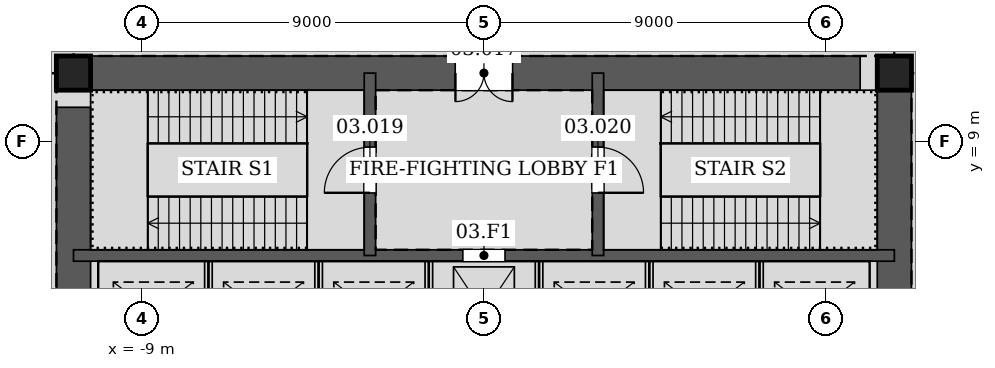
"""IFC4 building model, lengths in metres.
Left out: names, types, materials, properties, quantities, classifications, styles, units other than length and angle.
Written with IfcOpenShell. Run it as: python <this file> out.ifc"""

import sys

from ifc_helpers import new_model, si_unit, direction, frame, frame_2d, origin, origin_2d, place, context, subcontext, project, spatial, rectangle, hollow_rectangle, extrude, element, fill, save


model = new_model("IFC4")
c1 = context("Model", 3, precision=1e-05, world=origin(), true_north=direction((0.0, 1.0)))
c2 = subcontext(c1, "Body", "Model", "MODEL_VIEW")
j1 = project(units=[si_unit("LENGTHUNIT", "METRE"), si_unit("PLANEANGLEUNIT", "RADIAN")], contexts=[c1])
p1 = place(None, origin())
s1 = spatial("IfcSite", under=j1, at=p1, CompositionType="ELEMENT")
p2 = place(p1, origin())
s2 = spatial("IfcBuilding", under=s1, at=p2, CompositionType="ELEMENT")
p3 = place(p2, frame((0.0, 0.0, 18.6)))
s3 = spatial("IfcBuildingStorey", under=s2, at=p3, CompositionType="ELEMENT", Elevation=18.6)
for number, where, z_axis, x_axis in (
    (1, (10.8, 10.8, 0.0), (0.0, 0.0, 1.0), (1.0, 0.0, 0.0)),
    (2, (-10.8, 10.8, 0.0), (0.0, 0.0, 1.0), (1.0, 0.0, 0.0)),
):
    element("IfcColumn", number, at=place(p3, frame(where, z_axis=z_axis, x_axis=x_axis)), inside=s3, PredefinedType="COLUMN", context=c2, shape_type="SweptSolid", body=[
        extrude(hollow_rectangle(XDim=0.9, YDim=0.9, WallThickness=0.06, at=origin_2d()), origin(), (0.0, 0.0, 1.0), 5.4),
    ])
p4 = place(p3, frame((10.8, -10.8, 0.0), z_axis=(0.0, 0.0, 1.0), x_axis=(0.0, 1.0, 0.0)))
e3 = element("IfcWall", 3, at=p4, inside=s3, PredefinedType="SOLIDWALL", context=c2, shape_type="SweptSolid", body=[
    extrude(rectangle(XDim=21.6, YDim=0.9, at=frame_2d((10.8, 0.0))), origin(), (0.0, 0.0, 1.0), 5.4),
])
p5 = place(p4, frame((11.7, 0.0, 0.0)))
e4 = element("IfcOpeningElement", 4, at=p5, cuts=e3, PredefinedType="OPENING", context=c2, shape_type="SweptSolid", body=[
    extrude(rectangle(XDim=1.2, YDim=2.1, at=frame_2d((0.6, 1.05))), frame((0.0, 0.46, 0.0), z_axis=(0.0, -1.0, 0.0), x_axis=(1.0, 0.0, 0.0)), (0.0, 0.0, 1.0), 0.92),
])
p6 = place(p4, frame((8.7, 0.0, 0.0)))
e5 = element("IfcOpeningElement", 5, at=p6, cuts=e3, PredefinedType="OPENING", context=c2, shape_type="SweptSolid", body=[
    extrude(rectangle(XDim=1.2, YDim=2.1, at=frame_2d((0.6, 1.05))), frame((0.0, 0.46, 0.0), z_axis=(0.0, -1.0, 0.0), x_axis=(1.0, 0.0, 0.0)), (0.0, 0.0, 1.0), 0.92),
])
p7 = place(p3, frame((10.8, 10.8, 0.0), z_axis=(0.0, 0.0, 1.0), x_axis=(-1.0, 0.0, 0.0)))
e6 = element("IfcWall", 6, at=p7, inside=s3, PredefinedType="SOLIDWALL", context=c2, shape_type="SweptSolid", body=[
    extrude(rectangle(XDim=21.6, YDim=0.9, at=frame_2d((10.8, 0.0))), origin(), (0.0, 0.0, 1.0), 5.4),
])
p8 = place(p7, frame((10.05, 0.0, 0.0)))
e7 = element("IfcOpeningElement", 7, at=p8, cuts=e6, PredefinedType="OPENING", context=c2, shape_type="SweptSolid", body=[
    extrude(rectangle(XDim=1.5, YDim=2.1, at=frame_2d((0.75, 1.05))), frame((0.0, 0.46, 0.0), z_axis=(0.0, -1.0, 0.0), x_axis=(1.0, 0.0, 0.0)), (0.0, 0.0, 1.0), 0.92),
])
p9 = place(p3, frame((-10.8, 10.8, 0.0), z_axis=(0.0, 0.0, 1.0), x_axis=(0.0, -1.0, 0.0)))
e8 = element("IfcWall", 8, at=p9, inside=s3, PredefinedType="SOLIDWALL", context=c2, shape_type="SweptSolid", body=[
    extrude(rectangle(XDim=21.6, YDim=0.9, at=frame_2d((10.8, 0.0))), origin(), (0.0, 0.0, 1.0), 5.4),
])
p10 = place(p9, frame((8.7, 0.0, 0.0)))
e9 = element("IfcOpeningElement", 9, at=p10, cuts=e8, PredefinedType="OPENING", context=c2, shape_type="SweptSolid", body=[
    extrude(rectangle(XDim=1.2, YDim=2.1, at=frame_2d((0.6, 1.05))), frame((0.0, 0.46, 0.0), z_axis=(0.0, -1.0, 0.0), x_axis=(1.0, 0.0, 0.0)), (0.0, 0.0, 1.0), 0.92),
])
p11 = place(p9, frame((11.7, 0.0, 0.0)))
e10 = element("IfcOpeningElement", 10, at=p11, cuts=e8, PredefinedType="OPENING", context=c2, shape_type="SweptSolid", body=[
    extrude(rectangle(XDim=1.2, YDim=2.1, at=frame_2d((0.6, 1.05))), frame((0.0, 0.46, 0.0), z_axis=(0.0, -1.0, 0.0), x_axis=(1.0, 0.0, 0.0)), (0.0, 0.0, 1.0), 0.92),
])
p12 = place(p3, frame((-10.8, 6.0, 0.0), z_axis=(0.0, 0.0, 1.0), x_axis=(1.0, 0.0, 0.0)))
e11 = element("IfcWall", 11, at=p12, inside=s3, PredefinedType="SOLIDWALL", context=c2, shape_type="SweptSolid", body=[
    extrude(rectangle(XDim=21.6, YDim=0.3, at=frame_2d((10.8, 0.0))), origin(), (0.0, 0.0, 1.0), 5.4),
])
p13 = place(p12, frame((10.25, 0.0, 0.0)))
e12 = element("IfcOpeningElement", 12, at=p13, cuts=e11, PredefinedType="OPENING", context=c2, shape_type="SweptSolid", body=[
    extrude(rectangle(XDim=1.1, YDim=2.1, at=frame_2d((0.55, 1.05))), frame((0.0, 0.16, 0.0), z_axis=(0.0, -1.0, 0.0), x_axis=(1.0, 0.0, 0.0)), (0.0, 0.0, 1.0), 0.32),
])
p14 = place(p3, frame((-3.0, 6.0, 0.0), z_axis=(0.0, 0.0, 1.0), x_axis=(0.0, 1.0, 0.0)))
e13 = element("IfcWall", 13, at=p14, inside=s3, PredefinedType="SOLIDWALL", context=c2, shape_type="SweptSolid", body=[
    extrude(rectangle(XDim=4.8, YDim=0.3, at=frame_2d((2.4, 0.0))), origin(), (0.0, 0.0, 1.0), 5.4),
])
p15 = place(p14, frame((1.65, 0.0, 0.0)))
e14 = element("IfcOpeningElement", 14, at=p15, cuts=e13, PredefinedType="OPENING", context=c2, shape_type="SweptSolid", body=[
    extrude(rectangle(XDim=1.2, YDim=2.1, at=frame_2d((0.6, 1.05))), frame((0.0, 0.16, 0.0), z_axis=(0.0, -1.0, 0.0), x_axis=(1.0, 0.0, 0.0)), (0.0, 0.0, 1.0), 0.32),
])
p16 = place(p3, frame((3.0, 6.0, 0.0), z_axis=(0.0, 0.0, 1.0), x_axis=(0.0, 1.0, 0.0)))
e15 = element("IfcWall", 15, at=p16, inside=s3, PredefinedType="SOLIDWALL", context=c2, shape_type="SweptSolid", body=[
    extrude(rectangle(XDim=4.8, YDim=0.3, at=frame_2d((2.4, 0.0))), origin(), (0.0, 0.0, 1.0), 5.4),
])
p17 = place(p16, frame((1.65, 0.0, 0.0)))
e16 = element("IfcOpeningElement", 16, at=p17, cuts=e15, PredefinedType="OPENING", context=c2, shape_type="SweptSolid", body=[
    extrude(rectangle(XDim=1.2, YDim=2.1, at=frame_2d((0.6, 1.05))), frame((0.0, 0.16, 0.0), z_axis=(0.0, -1.0, 0.0), x_axis=(1.0, 0.0, 0.0)), (0.0, 0.0, 1.0), 0.32),
])
for number, where, z_axis, x_axis in (
    (17, (-7.25, 3.15, 0.0), (0.0, 0.0, 1.0), (0.0, 1.0, 0.0)),
    (18, (-4.35, 3.15, 0.0), (0.0, 0.0, 1.0), (0.0, 1.0, 0.0)),
    (19, (-1.45, 3.15, 0.0), (0.0, 0.0, 1.0), (0.0, 1.0, 0.0)),
    (20, (1.45, 3.15, 0.0), (0.0, 0.0, 1.0), (0.0, 1.0, 0.0)),
    (21, (4.35, 3.15, 0.0), (0.0, 0.0, 1.0), (0.0, 1.0, 0.0)),
    (22, (7.25, 3.15, 0.0), (0.0, 0.0, 1.0), (0.0, 1.0, 0.0)),
):
    element("IfcWall", number, at=place(p3, frame(where, z_axis=z_axis, x_axis=x_axis)), inside=s3, PredefinedType="PARTITIONING", context=c2, shape_type="SweptSolid", body=[
        extrude(rectangle(XDim=2.7, YDim=0.2, at=frame_2d((1.35, 0.0))), origin(), (0.0, 0.0, 1.0), 5.4),
    ])
p18 = place(p8, origin())
e23 = element("IfcDoor", 23, at=p18, inside=s3, OperationType="DOUBLE_DOOR_SINGLE_SWING", PredefinedType="DOOR", context=c2, shape_type="SweptSolid", body=[
    extrude(rectangle(XDim=1.5, YDim=2.1, at=frame_2d((0.75, 1.05))), frame((0.0, 0.025, 0.0), z_axis=(0.0, -1.0, 0.0), x_axis=(1.0, 0.0, 0.0)), (0.0, 0.0, 1.0), 0.05),
])
fill(e7, e23)
p19 = place(p15, origin())
e24 = element("IfcDoor", 24, at=p19, inside=s3, OperationType="SINGLE_SWING_LEFT", PredefinedType="DOOR", context=c2, shape_type="SweptSolid", body=[
    extrude(rectangle(XDim=1.2, YDim=2.1, at=frame_2d((0.6, 1.05))), frame((0.0, 0.025, 0.0), z_axis=(0.0, -1.0, 0.0), x_axis=(1.0, 0.0, 0.0)), (0.0, 0.0, 1.0), 0.05),
])
fill(e14, e24)
p20 = place(p17, frame((1.2, 0.0, 0.0), z_axis=(0.0, 0.0, 1.0), x_axis=(-1.0, 0.0, 0.0)))
e25 = element("IfcDoor", 25, at=p20, inside=s3, OperationType="SINGLE_SWING_RIGHT", PredefinedType="DOOR", context=c2, shape_type="SweptSolid", body=[
    extrude(rectangle(XDim=1.2, YDim=2.1, at=frame_2d((0.6, 1.05))), frame((0.0, 0.025, 0.0), z_axis=(0.0, -1.0, 0.0), x_axis=(1.0, 0.0, 0.0)), (0.0, 0.0, 1.0), 0.05),
])
fill(e16, e25)
p21 = place(p13, origin())
e26 = element("IfcDoor", 26, at=p21, inside=s3, OperationType="DOUBLE_DOOR_SLIDING", PredefinedType="DOOR", context=c2, shape_type="SweptSolid", body=[
    extrude(rectangle(XDim=1.1, YDim=2.1, at=frame_2d((0.55, 1.05))), frame((0.0, 0.025, 0.0), z_axis=(0.0, -1.0, 0.0), x_axis=(1.0, 0.0, 0.0)), (0.0, 0.0, 1.0), 0.05),
])
fill(e12, e26)
save(model, sys.argv[1])
